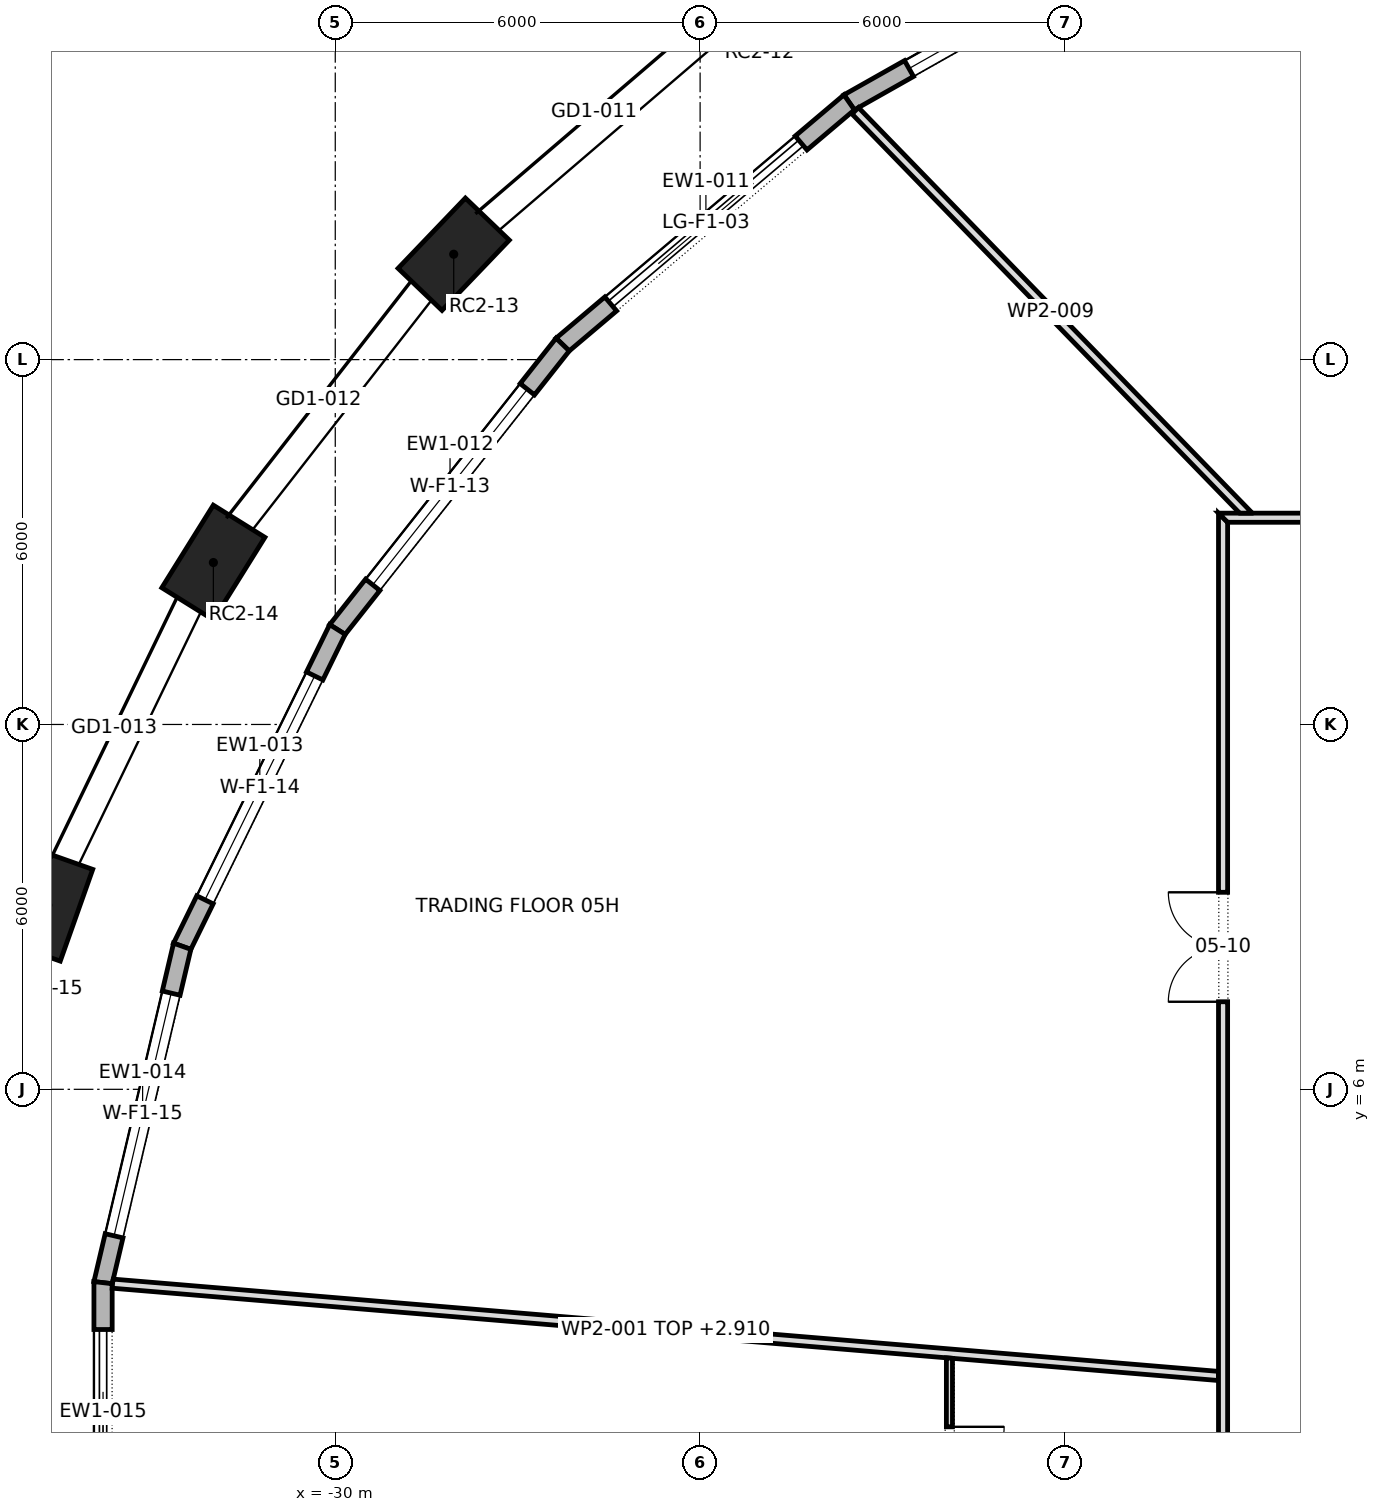
"""IFC4 building model, lengths in metres.
Left out: names, types, materials, properties, quantities, classifications, styles, units other than length and angle.
Written with IfcOpenShell. Run it as: python <this file> out.ifc"""

import sys

from ifc_helpers import new_model, si_unit, direction, frame, frame_2d, origin, origin_2d, place, context, subcontext, project, spatial, polyline, rectangle, outline, extrude, element, fill, save


model = new_model("IFC4")
c1 = context("Model", 3, precision=1e-05, world=origin(), true_north=direction((0.0, 1.0)))
c2 = subcontext(c1, "Body", "Model", "MODEL_VIEW")
j1 = project(units=[si_unit("LENGTHUNIT", "METRE"), si_unit("PLANEANGLEUNIT", "RADIAN")], contexts=[c1])
p1 = place(None, origin())
s1 = spatial("IfcSite", under=j1, at=p1, CompositionType="ELEMENT")
p2 = place(p1, origin())
s2 = spatial("IfcBuilding", under=s1, at=p2, CompositionType="ELEMENT")
p3 = place(p2, frame((0.0, 0.0, 82.3)))
s3 = spatial("IfcBuildingStorey", under=s2, at=p3, CompositionType="ELEMENT", Elevation=82.3)
for number, where, z_axis, x_axis in (
    (1, (-28.052, 19.733, 0.0), (0.0, 0.0, 1.0), (-0.692, -0.722, 0.0)),
    (2, (-32.004, 14.663, 0.0), (0.0, 0.0, 1.0), (-0.529, -0.849, 0.0)),
    (3, (-34.727, 9.029, 0.0), (0.0, 0.0, 1.0), (-0.334, -0.943, 0.0)),
):
    element("IfcColumn", number, at=place(p3, frame(where, z_axis=z_axis, x_axis=x_axis)), inside=s3, PredefinedType="COLUMN", context=c2, shape_type="SweptSolid", body=[
        extrude(rectangle(XDim=1.6, YDim=1.0, at=origin_2d()), origin(), (0.0, 0.0, 1.0), 4.2),
    ])
p4 = place(p3, frame((-16.01, 25.359, 0.0), z_axis=(0.0, 0.0, 1.0), x_axis=(-0.870710061474, -0.491796694629, 0.0)))
e4 = element("IfcWall", 4, at=p4, inside=s3, PredefinedType="STANDARD", context=c2, shape_type="SweptSolid", body=[
    extrude(outline(polyline([(-0.013, -0.15), (6.375, -0.15), (6.346, 0.15), (0.013, 0.15), (-0.013, -0.15)])), origin(), (0.0, 0.0, 1.0), 3.9),
])
p5 = place(p4, frame((1.13, 0.0, 0.6)))
e5 = element("IfcOpeningElement", 5, at=p5, cuts=e4, PredefinedType="OPENING", context=c2, shape_type="SweptSolid", body=[
    extrude(rectangle(XDim=4.1, YDim=2.85, at=frame_2d((2.05, 1.425))), frame((0.0, 0.162, 0.0), z_axis=(0.0, -1.0, 0.0), x_axis=(1.0, 0.0, 0.0)), (0.0, 0.0, 1.0), 0.324),
])
p6 = place(p3, frame((-21.549, 22.231, 0.0), z_axis=(0.0, 0.0, 1.0), x_axis=(-0.763693886759, -0.645578536916, 0.0)))
e6 = element("IfcWall", 6, at=p6, inside=s3, PredefinedType="STANDARD", context=c2, shape_type="SweptSolid", body=[
    extrude(outline(polyline([(-0.014, -0.15), (6.185, -0.15), (6.155, 0.15), (0.014, 0.15), (-0.014, -0.15)])), origin(), (0.0, 0.0, 1.0), 3.9),
])
p7 = place(p6, frame((1.035, 0.0, 0.0)))
e7 = element("IfcOpeningElement", 7, at=p7, cuts=e6, PredefinedType="OPENING", context=c2, shape_type="SweptSolid", body=[
    extrude(rectangle(XDim=4.1, YDim=3.45, at=frame_2d((2.05, 1.725))), frame((0.0, 0.162, 0.0), z_axis=(0.0, -1.0, 0.0), x_axis=(1.0, 0.0, 0.0)), (0.0, 0.0, 1.0), 0.324),
])
p8 = place(p3, frame((-26.26, 18.248, 0.0), z_axis=(0.0, 0.0, 1.0), x_axis=(-0.620093447965, -0.784527957303, 0.0)))
e8 = element("IfcWall", 8, at=p8, inside=s3, PredefinedType="STANDARD", context=c2, shape_type="SweptSolid", body=[
    extrude(outline(polyline([(-0.015, -0.15), (5.989, -0.15), (5.957, 0.15), (0.015, 0.15), (-0.015, -0.15)])), origin(), (0.0, 0.0, 1.0), 3.9),
])
p9 = place(p8, frame((0.937, 0.0, 0.6)))
e9 = element("IfcOpeningElement", 9, at=p9, cuts=e8, PredefinedType="OPENING", context=c2, shape_type="SweptSolid", body=[
    extrude(rectangle(XDim=4.1, YDim=2.85, at=frame_2d((2.05, 1.425))), frame((0.0, 0.162, 0.0), z_axis=(0.0, -1.0, 0.0), x_axis=(1.0, 0.0, 0.0)), (0.0, 0.0, 1.0), 0.324),
])
p10 = place(p3, frame((-29.964, 13.562, 0.0), z_axis=(0.0, 0.0, 1.0), x_axis=(-0.440027465772, -0.897984314655, 0.0)))
e10 = element("IfcWall", 10, at=p10, inside=s3, PredefinedType="STANDARD", context=c2, shape_type="SweptSolid", body=[
    extrude(outline(polyline([(-0.016, -0.15), (5.818, -0.15), (5.784, 0.15), (0.016, 0.15), (-0.016, -0.15)])), origin(), (0.0, 0.0, 1.0), 3.9),
])
p11 = place(p10, frame((0.85, 0.0, 0.6)))
e11 = element("IfcOpeningElement", 11, at=p11, cuts=e10, PredefinedType="OPENING", context=c2, shape_type="SweptSolid", body=[
    extrude(rectangle(XDim=4.1, YDim=2.85, at=frame_2d((2.05, 1.425))), frame((0.0, 0.162, 0.0), z_axis=(0.0, -1.0, 0.0), x_axis=(1.0, 0.0, 0.0)), (0.0, 0.0, 1.0), 0.324),
])
p12 = place(p3, frame((-32.517, 8.353, 0.0), z_axis=(0.0, 0.0, 1.0), x_axis=(-0.229058489262, -0.97341266095, 0.0)))
e12 = element("IfcWall", 12, at=p12, inside=s3, PredefinedType="STANDARD", context=c2, shape_type="SweptSolid", body=[
    extrude(outline(polyline([(-0.017, -0.15), (5.7, -0.15), (5.666, 0.15), (0.017, 0.15), (-0.017, -0.15)])), origin(), (0.0, 0.0, 1.0), 3.9),
])
p13 = place(p12, frame((0.792, 0.0, 0.6)))
e13 = element("IfcOpeningElement", 13, at=p13, cuts=e12, PredefinedType="OPENING", context=c2, shape_type="SweptSolid", body=[
    extrude(rectangle(XDim=4.1, YDim=2.85, at=frame_2d((2.05, 1.425))), frame((0.0, 0.162, 0.0), z_axis=(0.0, -1.0, 0.0), x_axis=(1.0, 0.0, 0.0)), (0.0, 0.0, 1.0), 0.324),
])
p14 = place(p3, frame((-33.819, 2.821, 0.0), z_axis=(0.0, 0.0, 1.0), x_axis=(0.0, -1.0, 0.0)))
e14 = element("IfcWall", 14, at=p14, inside=s3, PredefinedType="STANDARD", context=c2, shape_type="SweptSolid", body=[
    extrude(outline(polyline([(-0.017, -0.15), (5.658, -0.15), (5.624, 0.15), (0.017, 0.15), (-0.017, -0.15)])), origin(), (0.0, 0.0, 1.0), 3.9),
])
p15 = place(p14, frame((0.771, 0.0, 0.0)))
e15 = element("IfcOpeningElement", 15, at=p15, cuts=e14, PredefinedType="OPENING", context=c2, shape_type="SweptSolid", body=[
    extrude(rectangle(XDim=4.1, YDim=3.45, at=frame_2d((2.05, 1.725))), frame((0.0, 0.162, 0.0), z_axis=(0.0, -1.0, 0.0), x_axis=(1.0, 0.0, 0.0)), (0.0, 0.0, 1.0), 0.324),
])
p16 = place(p3, frame((-33.662, 2.804, 0.0), z_axis=(0.0, 0.0, 1.0), x_axis=(0.996534589799, -0.083179392484, 0.0)))
e16 = element("IfcWall", 16, at=p16, inside=s3, PredefinedType="PARTITIONING", context=c2, shape_type="SweptSolid", body=[
    extrude(outline(polyline([(18.256, -0.075), (18.256, -0.069), (18.244, 0.075), (16.42, 0.075), (14.596, 0.075), (12.773, 0.075), (10.949, 0.075), (9.125, 0.075), (7.301, 0.075), (5.477, 0.075), (3.653, 0.075), (1.829, 0.075), (0.005, 0.075), (0.0, 0.04), (0.0, -0.075), (1.826, -0.075), (3.651, -0.075), (5.477, -0.075), (7.302, -0.075), (9.128, -0.075), (10.954, -0.075), (12.78, -0.075), (14.605, -0.075), (16.431, -0.075), (18.256, -0.075)])), origin(), (0.0, 0.0, 1.0), 2.91),
])
p17 = place(p3, frame((-19.9, -13.744, 0.0), z_axis=(0.0, 0.0, 1.0), x_axis=(0.0, 1.0, 0.0)))
e17 = element("IfcWall", 17, at=p17, inside=s3, PredefinedType="PARTITIONING", context=c2, shape_type="SweptSolid", body=[
    extrude(outline(polyline([(0.069, -0.05), (1.976, -0.05), (3.882, -0.05), (5.788, -0.05), (7.695, -0.05), (9.601, -0.05), (11.508, -0.05), (13.414, -0.05), (15.321, -0.05), (15.329, 0.049), (15.329, 0.05), (13.644, 0.05), (11.958, 0.05), (10.273, 0.05), (8.588, 0.05), (8.58, 0.048), (8.58, 0.05), (6.864, 0.05), (5.148, 0.05), (3.432, 0.05), (1.716, 0.05), (0.0, 0.05), (0.0, 0.05), (0.069, -0.05)])), origin(), (0.0, 0.0, 1.0), 3.9),
])
p18 = place(p17, frame((3.844, 0.0, 0.0)))
e18 = element("IfcOpeningElement", 18, at=p18, cuts=e17, PredefinedType="OPENING", context=c2, shape_type="SweptSolid", body=[
    extrude(rectangle(XDim=0.9, YDim=2.1, at=frame_2d((0.45, 1.05))), frame((0.0, 0.062, 0.0), z_axis=(0.0, -1.0, 0.0), x_axis=(1.0, 0.0, 0.0)), (0.0, 0.0, 1.0), 0.124),
])
p19 = place(p17, frame((13.294, 0.0, 0.0)))
e19 = element("IfcOpeningElement", 19, at=p19, cuts=e17, PredefinedType="OPENING", context=c2, shape_type="SweptSolid", body=[
    extrude(rectangle(XDim=0.9, YDim=2.1, at=frame_2d((0.45, 1.05))), frame((0.0, 0.062, 0.0), z_axis=(0.0, -1.0, 0.0), x_axis=(1.0, 0.0, 0.0)), (0.0, 0.0, 1.0), 0.124),
])
p20 = place(p3, frame((-15.4, -15.475, 0.0), z_axis=(0.0, 0.0, 1.0), x_axis=(0.0, 1.0, 0.0)))
e20 = element("IfcWall", 20, at=p20, inside=s3, PredefinedType="PARTITIONING", context=c2, shape_type="SweptSolid", body=[
    extrude(outline(polyline([(0.15, -0.075), (2.066, -0.075), (3.981, -0.075), (5.897, -0.075), (7.812, -0.075), (9.728, -0.075), (11.644, -0.075), (13.56, -0.075), (15.475, -0.075), (17.391, -0.075), (19.306, -0.075), (21.222, -0.075), (23.138, -0.075), (25.053, -0.075), (26.969, -0.075), (28.885, -0.075), (30.8, -0.075), (30.95, 0.075), (29.016, 0.075), (27.081, 0.075), (25.147, 0.075), (23.212, 0.075), (21.278, 0.075), (19.344, 0.075), (17.409, 0.075), (15.475, 0.075), (13.541, 0.075), (11.606, 0.075), (9.672, 0.075), (7.738, 0.075), (5.803, 0.075), (3.869, 0.075), (1.935, 0.075), (0.0, 0.075), (0.15, -0.075)])), origin(), (0.0, 0.0, 1.0), 3.9),
])
p21 = place(p20, frame((10.275, 0.0, 0.0)))
e21 = element("IfcOpeningElement", 21, at=p21, cuts=e20, PredefinedType="OPENING", context=c2, shape_type="SweptSolid", body=[
    extrude(rectangle(XDim=1.0, YDim=2.1, at=frame_2d((0.5, 1.05))), frame((0.0, 0.087, 0.0), z_axis=(0.0, -1.0, 0.0), x_axis=(1.0, 0.0, 0.0)), (0.0, 0.0, 1.0), 0.174),
])
p22 = place(p20, frame((22.915, 0.0, 0.0)))
e22 = element("IfcOpeningElement", 22, at=p22, cuts=e20, PredefinedType="OPENING", context=c2, shape_type="SweptSolid", body=[
    extrude(rectangle(XDim=1.8, YDim=2.1, at=frame_2d((0.9, 1.05))), frame((0.0, 0.087, 0.0), z_axis=(0.0, -1.0, 0.0), x_axis=(1.0, 0.0, 0.0)), (0.0, 0.0, 1.0), 0.174),
])
p23 = place(p3, frame((-15.475, 15.4, 0.0), z_axis=(0.0, 0.0, 1.0), x_axis=(1.0, 0.0, 0.0)))
e23 = element("IfcWall", 23, at=p23, inside=s3, PredefinedType="PARTITIONING", context=c2, shape_type="SweptSolid", body=[
    extrude(outline(polyline([(0.15, -0.075), (2.066, -0.075), (3.981, -0.075), (5.897, -0.075), (7.812, -0.075), (9.728, -0.075), (11.644, -0.075), (13.56, -0.075), (15.475, -0.075), (17.391, -0.075), (19.306, -0.075), (21.222, -0.075), (23.138, -0.075), (25.053, -0.075), (26.969, -0.075), (28.885, -0.075), (30.8, -0.075), (30.95, 0.075), (29.016, 0.075), (27.081, 0.075), (25.147, 0.075), (23.212, 0.075), (21.278, 0.075), (19.344, 0.075), (17.409, 0.075), (15.475, 0.075), (13.541, 0.075), (11.606, 0.075), (9.672, 0.075), (7.738, 0.075), (5.803, 0.075), (3.869, 0.075), (1.935, 0.075), (0.0, 0.075), (0.15, -0.075)])), origin(), (0.0, 0.0, 1.0), 3.9),
])
p24 = place(p23, frame((26.573, 0.0, 0.0)))
e24 = element("IfcOpeningElement", 24, at=p24, cuts=e23, PredefinedType="OPENING", context=c2, shape_type="SweptSolid", body=[
    extrude(rectangle(XDim=1.8, YDim=2.1, at=frame_2d((0.9, 1.05))), frame((0.0, 0.087, 0.0), z_axis=(0.0, -1.0, 0.0), x_axis=(1.0, 0.0, 0.0)), (0.0, 0.0, 1.0), 0.174),
])
p25 = place(p23, frame((19.768, 0.0, 0.0)))
e25 = element("IfcOpeningElement", 25, at=p25, cuts=e23, PredefinedType="OPENING", context=c2, shape_type="SweptSolid", body=[
    extrude(rectangle(XDim=1.8, YDim=2.1, at=frame_2d((0.9, 1.05))), frame((0.0, 0.087, 0.0), z_axis=(0.0, -1.0, 0.0), x_axis=(1.0, 0.0, 0.0)), (0.0, 0.0, 1.0), 0.174),
])
p26 = place(p23, frame((7.995, 0.0, 0.0)))
e26 = element("IfcOpeningElement", 26, at=p26, cuts=e23, PredefinedType="OPENING", context=c2, shape_type="SweptSolid", body=[
    extrude(rectangle(XDim=1.8, YDim=2.1, at=frame_2d((0.9, 1.05))), frame((0.0, 0.087, 0.0), z_axis=(0.0, -1.0, 0.0), x_axis=(1.0, 0.0, 0.0)), (0.0, 0.0, 1.0), 0.174),
])
p27 = place(p3, frame((-14.972, 15.423, 0.0), z_axis=(0.0, 0.0, 1.0), x_axis=(-0.696670635557, 0.717391124529, 0.0)))
e27 = element("IfcWall", 27, at=p27, inside=s3, PredefinedType="PARTITIONING", context=c2, shape_type="SweptSolid", body=[
    extrude(outline(polyline([(9.296, 0.075), (7.466, 0.075), (5.636, 0.075), (3.806, 0.075), (1.975, 0.075), (0.145, 0.075), (0.0, -0.074), (0.0, -0.075), (1.859, -0.075), (3.719, -0.075), (5.578, -0.075), (7.437, -0.075), (9.296, -0.075), (9.296, 0.075)])), origin(), (0.0, 0.0, 1.0), 3.9),
])
p28 = place(p5, origin())
e28 = element("IfcWindow", 28, at=p28, inside=s3, PartitioningType="TRIPLE_PANEL_VERTICAL", PredefinedType="WINDOW", context=c2, shape_type="SweptSolid", body=[
    extrude(rectangle(XDim=4.1, YDim=2.85, at=frame_2d((2.05, 1.425))), frame((0.0, 0.03, 0.0), z_axis=(0.0, -1.0, 0.0), x_axis=(1.0, 0.0, 0.0)), (0.0, 0.0, 1.0), 0.06),
])
fill(e5, e28)
p29 = place(p7, origin())
e29 = element("IfcDoor", 29, at=p29, inside=s3, OperationType="DOUBLE_DOOR_SLIDING", PredefinedType="DOOR", context=c2, shape_type="SweptSolid", body=[
    extrude(rectangle(XDim=4.1, YDim=3.45, at=frame_2d((2.05, 1.725))), frame((0.0, 0.025, 0.0), z_axis=(0.0, -1.0, 0.0), x_axis=(1.0, 0.0, 0.0)), (0.0, 0.0, 1.0), 0.05),
])
fill(e7, e29)
p30 = place(p9, origin())
e30 = element("IfcWindow", 30, at=p30, inside=s3, PartitioningType="TRIPLE_PANEL_VERTICAL", PredefinedType="WINDOW", context=c2, shape_type="SweptSolid", body=[
    extrude(rectangle(XDim=4.1, YDim=2.85, at=frame_2d((2.05, 1.425))), frame((0.0, 0.03, 0.0), z_axis=(0.0, -1.0, 0.0), x_axis=(1.0, 0.0, 0.0)), (0.0, 0.0, 1.0), 0.06),
])
fill(e9, e30)
p31 = place(p11, origin())
e31 = element("IfcWindow", 31, at=p31, inside=s3, PartitioningType="TRIPLE_PANEL_VERTICAL", PredefinedType="WINDOW", context=c2, shape_type="SweptSolid", body=[
    extrude(rectangle(XDim=4.1, YDim=2.85, at=frame_2d((2.05, 1.425))), frame((0.0, 0.03, 0.0), z_axis=(0.0, -1.0, 0.0), x_axis=(1.0, 0.0, 0.0)), (0.0, 0.0, 1.0), 0.06),
])
fill(e11, e31)
p32 = place(p13, origin())
e32 = element("IfcWindow", 32, at=p32, inside=s3, PartitioningType="TRIPLE_PANEL_VERTICAL", PredefinedType="WINDOW", context=c2, shape_type="SweptSolid", body=[
    extrude(rectangle(XDim=4.1, YDim=2.85, at=frame_2d((2.05, 1.425))), frame((0.0, 0.03, 0.0), z_axis=(0.0, -1.0, 0.0), x_axis=(1.0, 0.0, 0.0)), (0.0, 0.0, 1.0), 0.06),
])
fill(e13, e32)
p33 = place(p15, origin())
e33 = element("IfcDoor", 33, at=p33, inside=s3, OperationType="DOUBLE_DOOR_SLIDING", PredefinedType="DOOR", context=c2, shape_type="SweptSolid", body=[
    extrude(rectangle(XDim=4.1, YDim=3.45, at=frame_2d((2.05, 1.725))), frame((0.0, 0.025, 0.0), z_axis=(0.0, -1.0, 0.0), x_axis=(1.0, 0.0, 0.0)), (0.0, 0.0, 1.0), 0.05),
])
fill(e15, e33)
p34 = place(p22, origin())
e34 = element("IfcDoor", 34, at=p34, inside=s3, OperationType="DOUBLE_DOOR_SINGLE_SWING", PredefinedType="DOOR", context=c2, shape_type="SweptSolid", body=[
    extrude(rectangle(XDim=1.8, YDim=2.1, at=frame_2d((0.9, 1.05))), frame((0.0, 0.025, 0.0), z_axis=(0.0, -1.0, 0.0), x_axis=(1.0, 0.0, 0.0)), (0.0, 0.0, 1.0), 0.05),
])
fill(e22, e34)
p35 = place(p19, frame((0.9, 0.0, 0.0), z_axis=(0.0, 0.0, 1.0), x_axis=(-1.0, 0.0, 0.0)))
e35 = element("IfcDoor", 35, at=p35, inside=s3, OperationType="SINGLE_SWING_RIGHT", PredefinedType="DOOR", context=c2, shape_type="SweptSolid", body=[
    extrude(rectangle(XDim=0.9, YDim=2.1, at=frame_2d((0.45, 1.05))), frame((0.0, 0.025, 0.0), z_axis=(0.0, -1.0, 0.0), x_axis=(1.0, 0.0, 0.0)), (0.0, 0.0, 1.0), 0.05),
])
fill(e19, e35)
save(model, sys.argv[1])
